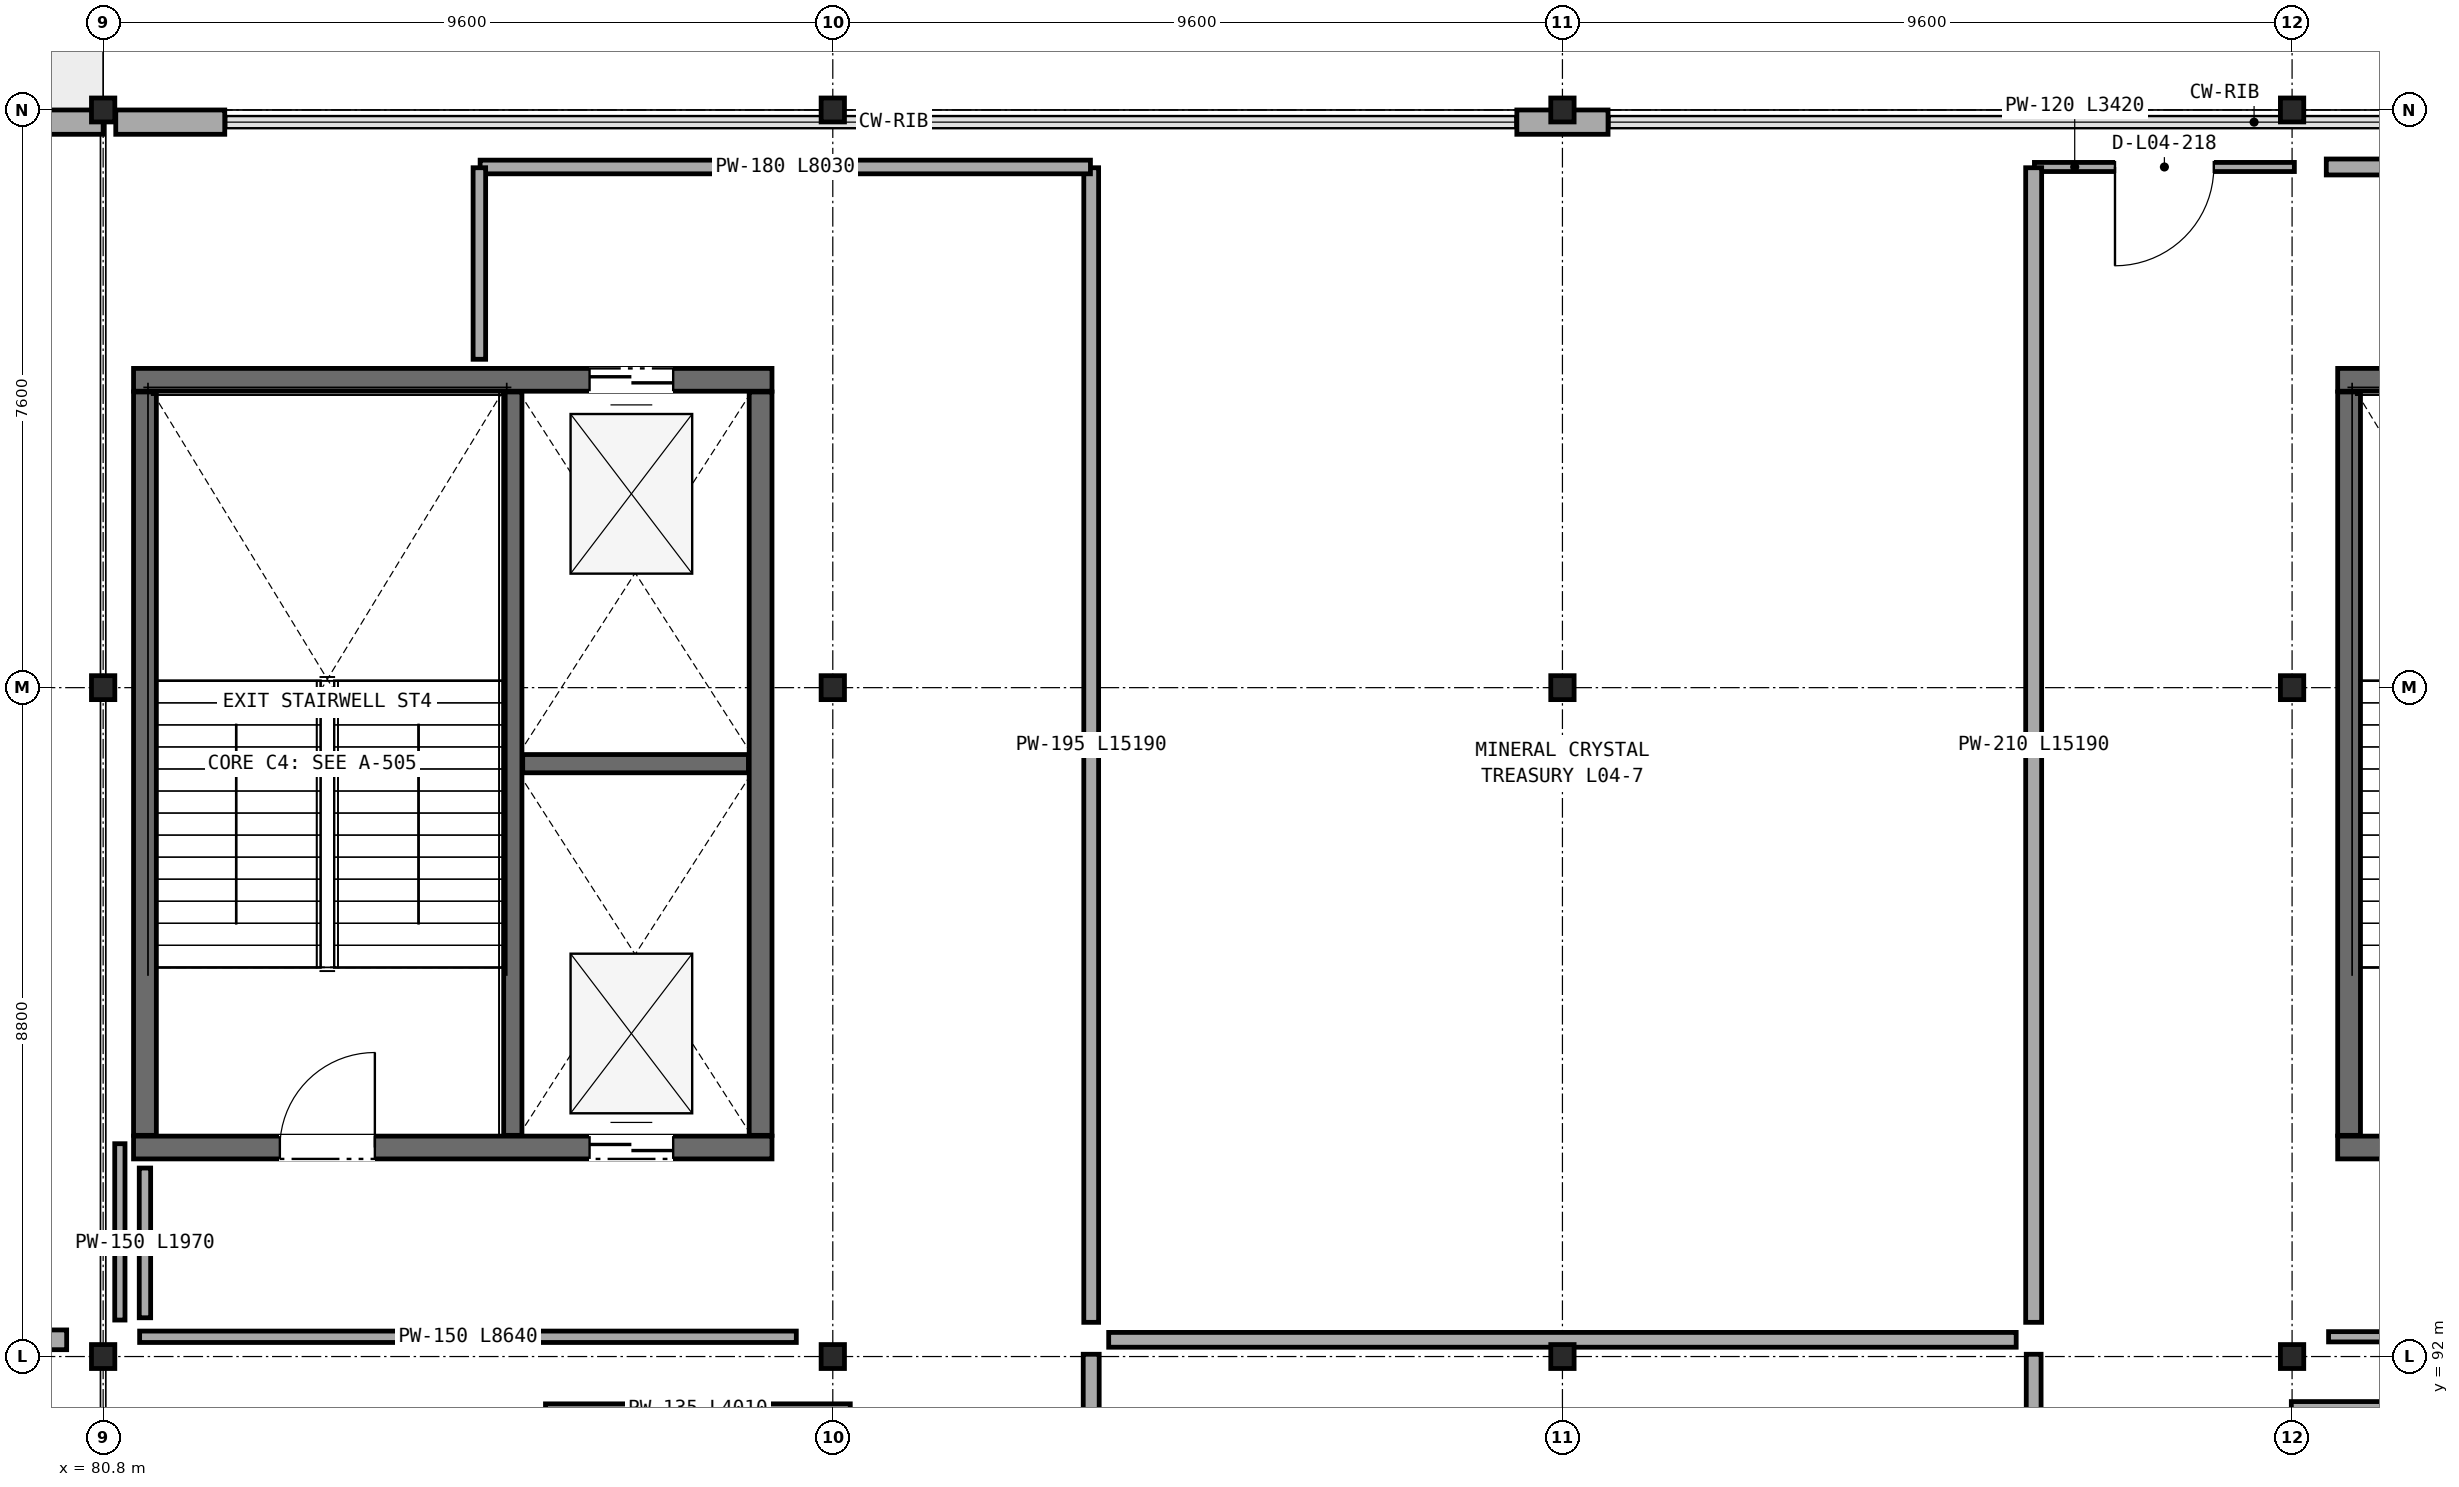
"""IFC4 building model, lengths in metres.
Left out: names, types, materials, properties, quantities, classifications, styles, units other than length and angle.
Written with IfcOpenShell. Run it as: python <this file> out.ifc"""

import sys

from ifc_helpers import new_model, si_unit, direction, frame, frame_2d, origin, origin_2d, place, context, subcontext, project, spatial, rectangle, i_section, extrude, element, fill, save


model = new_model("IFC4")
c1 = context("Model", 3, precision=1e-05, world=origin(), true_north=direction((0.0, 1.0)))
c2 = subcontext(c1, "Body", "Model", "MODEL_VIEW")
j1 = project(units=[si_unit("LENGTHUNIT", "METRE"), si_unit("PLANEANGLEUNIT", "RADIAN")], contexts=[c1])
p1 = place(None, origin())
s1 = spatial("IfcSite", under=j1, at=p1, CompositionType="ELEMENT")
p2 = place(p1, origin())
s2 = spatial("IfcBuilding", under=s1, at=p2, CompositionType="ELEMENT")
p3 = place(p2, frame((0.0, 0.0, 19.1)))
s3 = spatial("IfcBuildingStorey", under=s2, at=p3, CompositionType="ELEMENT", Elevation=19.1)
for number, where, z_axis, x_axis in (
    (1, (90.4, 92.0, 0.0), (0.0, 0.0, 1.0), (1.0, 0.0, 0.0)),
    (2, (90.4, 100.8, 0.0), (0.0, 0.0, 1.0), (1.0, 0.0, 0.0)),
    (3, (90.4, 108.4, 0.0), (0.0, 0.0, 1.0), (1.0, 0.0, 0.0)),
    (4, (100.0, 92.0, 0.0), (0.0, 0.0, 1.0), (1.0, 0.0, 0.0)),
    (5, (100.0, 100.8, 0.0), (0.0, 0.0, 1.0), (1.0, 0.0, 0.0)),
    (6, (100.0, 108.4, 0.0), (0.0, 0.0, 1.0), (1.0, 0.0, 0.0)),
    (7, (109.6, 92.0, 0.0), (0.0, 0.0, 1.0), (1.0, 0.0, 0.0)),
    (8, (109.6, 100.8, 0.0), (0.0, 0.0, 1.0), (1.0, 0.0, 0.0)),
    (9, (109.6, 108.4, 0.0), (0.0, 0.0, 1.0), (1.0, 0.0, 0.0)),
    (10, (80.8, 92.0, 0.0), (0.0, 0.0, 1.0), (1.0, 0.0, 0.0)),
    (11, (80.8, 100.8, 0.0), (0.0, 0.0, 1.0), (1.0, 0.0, 0.0)),
    (12, (80.8, 108.4, 0.0), (0.0, 0.0, 1.0), (1.0, 0.0, 0.0)),
):
    element("IfcColumn", number, at=place(p3, frame(where, z_axis=z_axis, x_axis=x_axis)), inside=s3, PredefinedType="COLUMN", context=c2, shape_type="SweptSolid", body=[
        extrude(i_section(OverallWidth=0.307, OverallDepth=0.315, WebThickness=0.012, FlangeThickness=0.019, FilletRadius=0.017, at=origin_2d()), origin(), (0.0, 0.0, 1.0), 9.0),
    ])
p4 = place(p3, frame((80.8, 108.24, 0.0), z_axis=(0.0, 0.0, 1.0), x_axis=(-1.0, 0.0, 0.0)))
e13 = element("IfcWall", 13, at=p4, inside=s3, PredefinedType="STANDARD", context=c2, shape_type="SweptSolid", body=[
    extrude(rectangle(XDim=38.4, YDim=0.32, at=frame_2d((19.2, 0.0))), origin(), (0.0, 0.0, 1.0), 8.202),
])
p5 = place(p4, frame((1.8, 0.0, 0.9)))
e14 = element("IfcOpeningElement", 14, at=p5, cuts=e13, PredefinedType="OPENING", context=c2, shape_type="SweptSolid", body=[
    extrude(rectangle(XDim=1.85, YDim=2.15, at=frame_2d((0.925, 1.075))), frame((0.0, 0.17, 0.0), z_axis=(0.0, -1.0, 0.0), x_axis=(1.0, 0.0, 0.0)), (0.0, 0.0, 1.0), 0.34),
])
p6 = place(p4, frame((6.4, 0.0, 0.9)))
e15 = element("IfcOpeningElement", 15, at=p6, cuts=e13, PredefinedType="OPENING", context=c2, shape_type="SweptSolid", body=[
    extrude(rectangle(XDim=2.12, YDim=2.15, at=frame_2d((1.06, 1.075))), frame((0.0, 0.17, 0.0), z_axis=(0.0, -1.0, 0.0), x_axis=(1.0, 0.0, 0.0)), (0.0, 0.0, 1.0), 0.34),
])
p7 = place(p4, frame((11.0, 0.0, 0.9)))
e16 = element("IfcOpeningElement", 16, at=p7, cuts=e13, PredefinedType="OPENING", context=c2, shape_type="SweptSolid", body=[
    extrude(rectangle(XDim=2.2, YDim=2.15, at=frame_2d((1.1, 1.075))), frame((0.0, 0.17, 0.0), z_axis=(0.0, -1.0, 0.0), x_axis=(1.0, 0.0, 0.0)), (0.0, 0.0, 1.0), 0.34),
])
p8 = place(p4, frame((15.6, 0.0, 0.9)))
e17 = element("IfcOpeningElement", 17, at=p8, cuts=e13, PredefinedType="OPENING", context=c2, shape_type="SweptSolid", body=[
    extrude(rectangle(XDim=2.52, YDim=2.15, at=frame_2d((1.26, 1.075))), frame((0.0, 0.17, 0.0), z_axis=(0.0, -1.0, 0.0), x_axis=(1.0, 0.0, 0.0)), (0.0, 0.0, 1.0), 0.34),
])
p9 = place(p4, frame((20.2, 0.0, 0.9)))
e18 = element("IfcOpeningElement", 18, at=p9, cuts=e13, PredefinedType="OPENING", context=c2, shape_type="SweptSolid", body=[
    extrude(rectangle(XDim=2.65, YDim=2.15, at=frame_2d((1.325, 1.075))), frame((0.0, 0.17, 0.0), z_axis=(0.0, -1.0, 0.0), x_axis=(1.0, 0.0, 0.0)), (0.0, 0.0, 1.0), 0.34),
])
p10 = place(p4, frame((24.8, 0.0, 0.75)))
e19 = element("IfcOpeningElement", 19, at=p10, cuts=e13, PredefinedType="OPENING", context=c2, shape_type="SweptSolid", body=[
    extrude(rectangle(XDim=0.95, YDim=2.5, at=frame_2d((0.475, 1.25))), frame((0.0, 0.17, 0.0), z_axis=(0.0, -1.0, 0.0), x_axis=(1.0, 0.0, 0.0)), (0.0, 0.0, 1.0), 0.34),
])
p11 = place(p3, frame((100.6, 108.24, 0.0), z_axis=(0.0, 0.0, 1.0), x_axis=(-1.0, 0.0, 0.0)))
e20 = element("IfcWall", 20, at=p11, inside=s3, PredefinedType="STANDARD", context=c2, shape_type="SweptSolid", body=[
    extrude(rectangle(XDim=1.2, YDim=0.32, at=frame_2d((0.6, 0.0))), origin(), (0.0, 0.0, 1.0), 8.202),
])
p12 = place(p3, frame((82.4, 108.24, 0.0), z_axis=(0.0, 0.0, 1.0), x_axis=(-1.0, 0.0, 0.0)))
e21 = element("IfcWall", 21, at=p12, inside=s3, PredefinedType="STANDARD", context=c2, shape_type="SweptSolid", body=[
    extrude(rectangle(XDim=1.434, YDim=0.32, at=frame_2d((0.717, 0.0))), origin(), (0.0, 0.0, 1.0), 8.202),
])
p13 = place(p3, frame((110.2, 94.75, 0.0), z_axis=(0.0, 0.0, 1.0), x_axis=(1.0, 0.0, 0.0)))
e22 = element("IfcWall", 22, at=p13, inside=s3, PredefinedType="SHEAR", context=c2, shape_type="SweptSolid", body=[
    extrude(rectangle(XDim=8.4, YDim=0.3, at=frame_2d((4.2, 0.0))), origin(), (0.0, 0.0, 1.0), 8.745),
])
p14 = place(p13, frame((5.925, 0.0, 0.0)))
e23 = element("IfcOpeningElement", 23, at=p14, cuts=e22, PredefinedType="OPENING", context=c2, shape_type="SweptSolid", body=[
    extrude(rectangle(XDim=1.45, YDim=2.25, at=frame_2d((0.725, 1.125))), frame((0.0, 0.16, 0.0), z_axis=(0.0, -1.0, 0.0), x_axis=(1.0, 0.0, 0.0)), (0.0, 0.0, 1.0), 0.32),
])
p15 = place(p3, frame((118.6, 104.85, 0.0), z_axis=(0.0, 0.0, 1.0), x_axis=(-1.0, 0.0, 0.0)))
e24 = element("IfcWall", 24, at=p15, inside=s3, PredefinedType="SHEAR", context=c2, shape_type="SweptSolid", body=[
    extrude(rectangle(XDim=8.4, YDim=0.3, at=frame_2d((4.2, 0.0))), origin(), (0.0, 0.0, 1.0), 8.745),
])
p16 = place(p3, frame((110.35, 104.69, 0.0), z_axis=(0.0, 0.0, 1.0), x_axis=(0.0, -1.0, 0.0)))
e25 = element("IfcWall", 25, at=p16, inside=s3, PredefinedType="SHEAR", context=c2, shape_type="SweptSolid", body=[
    extrude(rectangle(XDim=9.78, YDim=0.3, at=frame_2d((4.89, 0.0))), origin(), (0.0, 0.0, 1.0), 8.745),
])
p17 = place(p3, frame((81.2, 94.75, 0.0), z_axis=(0.0, 0.0, 1.0), x_axis=(1.0, 0.0, 0.0)))
e26 = element("IfcWall", 26, at=p17, inside=s3, PredefinedType="SHEAR", context=c2, shape_type="SweptSolid", body=[
    extrude(rectangle(XDim=8.4, YDim=0.3, at=frame_2d((4.2, 0.0))), origin(), (0.0, 0.0, 1.0), 8.745),
])
p18 = place(p17, frame((1.925, 0.0, 0.0)))
e27 = element("IfcOpeningElement", 27, at=p18, cuts=e26, PredefinedType="OPENING", context=c2, shape_type="SweptSolid", body=[
    extrude(rectangle(XDim=1.25, YDim=2.2, at=frame_2d((0.625, 1.1))), frame((0.0, 0.16, 0.0), z_axis=(0.0, -1.0, 0.0), x_axis=(1.0, 0.0, 0.0)), (0.0, 0.0, 1.0), 0.32),
])
p19 = place(p17, frame((6.0, 0.0, 0.0)))
e28 = element("IfcOpeningElement", 28, at=p19, cuts=e26, PredefinedType="OPENING", context=c2, shape_type="SweptSolid", body=[
    extrude(rectangle(XDim=1.1, YDim=2.2, at=frame_2d((0.55, 1.1))), frame((0.0, 0.16, 0.0), z_axis=(0.0, -1.0, 0.0), x_axis=(1.0, 0.0, 0.0)), (0.0, 0.0, 1.0), 0.32),
])
p20 = place(p3, frame((89.6, 104.85, 0.0), z_axis=(0.0, 0.0, 1.0), x_axis=(-1.0, 0.0, 0.0)))
e29 = element("IfcWall", 29, at=p20, inside=s3, PredefinedType="SHEAR", context=c2, shape_type="SweptSolid", body=[
    extrude(rectangle(XDim=8.4, YDim=0.3, at=frame_2d((4.2, 0.0))), origin(), (0.0, 0.0, 1.0), 8.745),
])
p21 = place(p20, frame((1.3, 0.0, 0.0)))
e30 = element("IfcOpeningElement", 30, at=p21, cuts=e29, PredefinedType="OPENING", context=c2, shape_type="SweptSolid", body=[
    extrude(rectangle(XDim=1.1, YDim=2.2, at=frame_2d((0.55, 1.1))), frame((0.0, 0.16, 0.0), z_axis=(0.0, -1.0, 0.0), x_axis=(1.0, 0.0, 0.0)), (0.0, 0.0, 1.0), 0.32),
])
for number, where, z_axis, x_axis in (
    (31, (89.45, 94.91, 0.0), (0.0, 0.0, 1.0), (0.0, 1.0, 0.0)),
    (32, (81.35, 104.69, 0.0), (0.0, 0.0, 1.0), (0.0, -1.0, 0.0)),
):
    element("IfcWall", number, at=place(p3, frame(where, z_axis=z_axis, x_axis=x_axis)), inside=s3, PredefinedType="SHEAR", context=c2, shape_type="SweptSolid", body=[
        extrude(rectangle(XDim=9.78, YDim=0.3, at=frame_2d((4.89, 0.0))), origin(), (0.0, 0.0, 1.0), 8.745),
    ])
p22 = place(p3, frame((86.19, 94.91, 0.0), z_axis=(0.0, 0.0, 1.0), x_axis=(0.0, 1.0, 0.0)))
e33 = element("IfcWall", 33, at=p22, inside=s3, PredefinedType="SOLIDWALL", context=c2, shape_type="SweptSolid", body=[
    extrude(rectangle(XDim=9.78, YDim=0.24, at=frame_2d((4.89, 0.0))), origin(), (0.0, 0.0, 1.0), 8.745),
])
p23 = place(p3, frame((86.32, 99.8, 0.0), z_axis=(0.0, 0.0, 1.0), x_axis=(1.0, 0.0, 0.0)))
e34 = element("IfcWall", 34, at=p23, inside=s3, PredefinedType="SOLIDWALL", context=c2, shape_type="SweptSolid", body=[
    extrude(rectangle(XDim=2.97, YDim=0.24, at=frame_2d((1.485, 0.0))), origin(), (0.0, 0.0, 1.0), 8.745),
])
p24 = place(p3, frame((109.59, 91.31, 0.0), z_axis=(0.0, 0.0, 1.0), x_axis=(1.0, 0.0, 0.0)))
e35 = element("IfcWall", 35, at=p24, inside=s3, PredefinedType="PARTITIONING", context=c2, shape_type="SweptSolid", body=[
    extrude(rectangle(XDim=4.39, YDim=0.195, at=frame_2d((2.195, 0.0))), origin(), (0.0, 0.0, 1.0), 8.263),
])
p25 = place(p3, frame((86.62, 91.31, 0.0), z_axis=(0.0, 0.0, 1.0), x_axis=(1.0, 0.0, 0.0)))
e36 = element("IfcWall", 36, at=p25, inside=s3, PredefinedType="PARTITIONING", context=c2, shape_type="SweptSolid", body=[
    extrude(rectangle(XDim=4.01, YDim=0.135, at=frame_2d((2.005, 0.0))), origin(), (0.0, 0.0, 1.0), 8.263),
])
p26 = place(p3, frame((81.28, 92.26, 0.0), z_axis=(0.0, 0.0, 1.0), x_axis=(1.0, 0.0, 0.0)))
e37 = element("IfcWall", 37, at=p26, inside=s3, PredefinedType="PARTITIONING", context=c2, shape_type="SweptSolid", body=[
    extrude(rectangle(XDim=8.64, YDim=0.15, at=frame_2d((4.32, 0.0))), origin(), (0.0, 0.0, 1.0), 8.187),
])
p27 = place(p3, frame((109.63, 107.65, 0.0), z_axis=(0.0, 0.0, 1.0), x_axis=(-1.0, 0.0, 0.0)))
e38 = element("IfcWall", 38, at=p27, inside=s3, PredefinedType="PARTITIONING", context=c2, shape_type="SweptSolid", body=[
    extrude(rectangle(XDim=3.42, YDim=0.12, at=frame_2d((1.71, 0.0))), origin(), (0.0, 0.0, 1.0), 8.263),
])
p28 = place(p27, frame((1.06, 0.0, 0.0)))
e39 = element("IfcOpeningElement", 39, at=p28, cuts=e38, PredefinedType="OPENING", context=c2, shape_type="SweptSolid", body=[
    extrude(rectangle(XDim=1.3, YDim=2.46, at=frame_2d((0.65, 1.23))), frame((0.0, 0.07, 0.0), z_axis=(0.0, -1.0, 0.0), x_axis=(1.0, 0.0, 0.0)), (0.0, 0.0, 1.0), 0.14),
])
p29 = place(p3, frame((106.2, 107.64, 0.0), z_axis=(0.0, 0.0, 1.0), x_axis=(0.0, -1.0, 0.0)))
e40 = element("IfcWall", 40, at=p29, inside=s3, PredefinedType="PARTITIONING", context=c2, shape_type="SweptSolid", body=[
    extrude(rectangle(XDim=15.19, YDim=0.21, at=frame_2d((7.595, 0.0))), origin(), (0.0, 0.0, 1.0), 8.187),
])
p30 = place(p3, frame((93.8, 92.45, 0.0), z_axis=(0.0, 0.0, 1.0), x_axis=(0.0, 1.0, 0.0)))
e41 = element("IfcWall", 41, at=p30, inside=s3, PredefinedType="PARTITIONING", context=c2, shape_type="SweptSolid", body=[
    extrude(rectangle(XDim=15.19, YDim=0.195, at=frame_2d((7.595, 0.0))), origin(), (0.0, 0.0, 1.0), 8.187),
])
p31 = place(p3, frame((93.79, 107.65, 0.0), z_axis=(0.0, 0.0, 1.0), x_axis=(-1.0, 0.0, 0.0)))
e42 = element("IfcWall", 42, at=p31, inside=s3, PredefinedType="PARTITIONING", context=c2, shape_type="SweptSolid", body=[
    extrude(rectangle(XDim=8.03, YDim=0.18, at=frame_2d((4.015, 0.0))), origin(), (0.0, 0.0, 1.0), 8.263),
])
p32 = place(p3, frame((85.75, 107.64, 0.0), z_axis=(0.0, 0.0, 1.0), x_axis=(0.0, -1.0, 0.0)))
e43 = element("IfcWall", 43, at=p32, inside=s3, PredefinedType="PARTITIONING", context=c2, shape_type="SweptSolid", body=[
    extrude(rectangle(XDim=2.52, YDim=0.165, at=frame_2d((1.26, 0.0))), origin(), (0.0, 0.0, 1.0), 8.63),
])
p33 = place(p3, frame((81.35, 94.48, 0.0), z_axis=(0.0, 0.0, 1.0), x_axis=(0.0, -1.0, 0.0)))
e44 = element("IfcWall", 44, at=p33, inside=s3, PredefinedType="PARTITIONING", context=c2, shape_type="SweptSolid", body=[
    extrude(rectangle(XDim=1.97, YDim=0.15, at=frame_2d((0.985, 0.0))), origin(), (0.0, 0.0, 1.0), 8.63),
])
p34 = place(p3, frame((81.02, 92.48, 0.0), z_axis=(0.0, 0.0, 1.0), x_axis=(0.0, 1.0, 0.0)))
e45 = element("IfcWall", 45, at=p34, inside=s3, PredefinedType="PARTITIONING", context=c2, shape_type="SweptSolid", body=[
    extrude(rectangle(XDim=2.32, YDim=0.135, at=frame_2d((1.16, 0.0))), origin(), (0.0, 0.0, 1.0), 8.263),
])
p35 = place(p3, frame((93.8, 79.88, 0.0), z_axis=(0.0, 0.0, 1.0), x_axis=(0.0, 1.0, 0.0)))
e46 = element("IfcWall", 46, at=p35, inside=s3, PredefinedType="PARTITIONING", context=c2, shape_type="SweptSolid", body=[
    extrude(rectangle(XDim=12.15, YDim=0.21, at=frame_2d((6.075, 0.0))), origin(), (0.0, 0.0, 1.0), 8.187),
])
p36 = place(p3, frame((106.2, 92.03, 0.0), z_axis=(0.0, 0.0, 1.0), x_axis=(0.0, -1.0, 0.0)))
e47 = element("IfcWall", 47, at=p36, inside=s3, PredefinedType="PARTITIONING", context=c2, shape_type="SweptSolid", body=[
    extrude(rectangle(XDim=12.15, YDim=0.195, at=frame_2d((6.075, 0.0))), origin(), (0.0, 0.0, 1.0), 8.187),
])
p37 = place(p3, frame((110.08, 92.26, 0.0), z_axis=(0.0, 0.0, 1.0), x_axis=(1.0, 0.0, 0.0)))
e48 = element("IfcWall", 48, at=p37, inside=s3, PredefinedType="PARTITIONING", context=c2, shape_type="SweptSolid", body=[
    extrude(rectangle(XDim=8.64, YDim=0.135, at=frame_2d((4.32, 0.0))), origin(), (0.0, 0.0, 1.0), 8.187),
])
p38 = place(p3, frame((115.24, 107.65, 0.0), z_axis=(0.0, 0.0, 1.0), x_axis=(-1.0, 0.0, 0.0)))
e49 = element("IfcWall", 49, at=p38, inside=s3, PredefinedType="PARTITIONING", context=c2, shape_type="SweptSolid", body=[
    extrude(rectangle(XDim=5.19, YDim=0.21, at=frame_2d((2.595, 0.0))), origin(), (0.0, 0.0, 1.0), 8.63),
])
p39 = place(p3, frame((105.97, 92.22, 0.0), z_axis=(0.0, 0.0, 1.0), x_axis=(-1.0, 0.0, 0.0)))
e50 = element("IfcWall", 50, at=p39, inside=s3, PredefinedType="PARTITIONING", context=c2, shape_type="SweptSolid", body=[
    extrude(rectangle(XDim=11.94, YDim=0.195, at=frame_2d((5.97, 0.0))), origin(), (0.0, 0.0, 1.0), 8.187),
])
p40 = place(p3, frame((80.32, 92.22, 0.0), z_axis=(0.0, 0.0, 1.0), x_axis=(-1.0, 0.0, 0.0)))
e51 = element("IfcWall", 51, at=p40, inside=s3, PredefinedType="SOLIDWALL", context=c2, shape_type="SweptSolid", body=[
    extrude(rectangle(XDim=12.04, YDim=0.26, at=frame_2d((6.02, 0.0))), origin(), (0.0, 0.0, 1.0), 8.187),
])
p41 = place(p18, origin())
e52 = element("IfcDoor", 52, at=p41, inside=s3, OperationType="SINGLE_SWING_RIGHT", PredefinedType="DOOR", context=c2, shape_type="SweptSolid", body=[
    extrude(rectangle(XDim=1.25, YDim=2.2, at=frame_2d((0.625, 1.1))), frame((0.0, 0.025, 0.0), z_axis=(0.0, -1.0, 0.0), x_axis=(1.0, 0.0, 0.0)), (0.0, 0.0, 1.0), 0.05),
])
fill(e27, e52)
p42 = place(p19, origin())
e53 = element("IfcDoor", 53, at=p42, inside=s3, OperationType="DOUBLE_DOOR_SLIDING", PredefinedType="DOOR", context=c2, shape_type="SweptSolid", body=[
    extrude(rectangle(XDim=1.1, YDim=2.2, at=frame_2d((0.55, 1.1))), frame((0.0, 0.025, 0.0), z_axis=(0.0, -1.0, 0.0), x_axis=(1.0, 0.0, 0.0)), (0.0, 0.0, 1.0), 0.05),
])
fill(e28, e53)
p43 = place(p21, origin())
e54 = element("IfcDoor", 54, at=p43, inside=s3, OperationType="DOUBLE_DOOR_SLIDING", PredefinedType="DOOR", context=c2, shape_type="SweptSolid", body=[
    extrude(rectangle(XDim=1.1, YDim=2.2, at=frame_2d((0.55, 1.1))), frame((0.0, 0.025, 0.0), z_axis=(0.0, -1.0, 0.0), x_axis=(1.0, 0.0, 0.0)), (0.0, 0.0, 1.0), 0.05),
])
fill(e30, e54)
p44 = place(p28, origin())
e55 = element("IfcDoor", 55, at=p44, inside=s3, OperationType="SINGLE_SWING_RIGHT", PredefinedType="DOOR", context=c2, shape_type="SweptSolid", body=[
    extrude(rectangle(XDim=1.3, YDim=2.46, at=frame_2d((0.65, 1.23))), frame((0.0, 0.025, 0.0), z_axis=(0.0, -1.0, 0.0), x_axis=(1.0, 0.0, 0.0)), (0.0, 0.0, 1.0), 0.05),
])
fill(e39, e55)
save(model, sys.argv[1])
